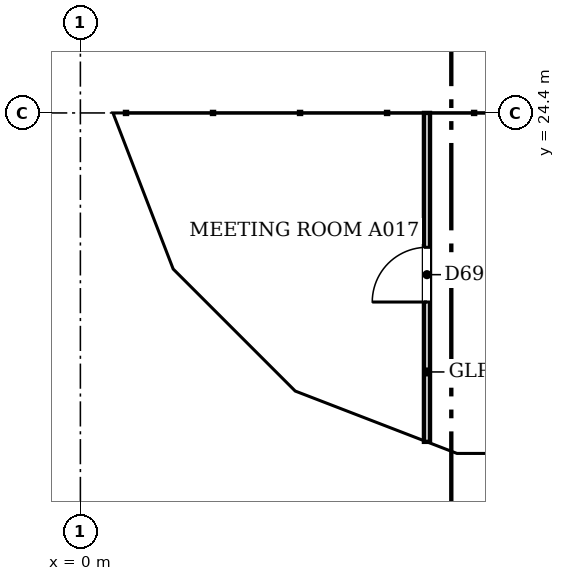
"""IFC4 building model, lengths in metres.
Left out: names, types, materials, properties, quantities, classifications, styles, units other than length and angle.
Written with IfcOpenShell. Run it as: python <this file> out.ifc"""

import sys

from ifc_helpers import new_model, si_unit, direction, frame, frame_2d, origin, place, context, subcontext, project, spatial, polyline, rectangle, outline, extrude, faceted_brep, source, transform, mapped, element, fill, save


model = new_model("IFC4")
c1 = context("Model", 3, precision=1e-05, world=origin(), true_north=direction((0.0, 1.0)))
c2 = subcontext(c1, "Body", "Model", "MODEL_VIEW")
j1 = project(units=[si_unit("LENGTHUNIT", "METRE"), si_unit("PLANEANGLEUNIT", "RADIAN")], contexts=[c1])
p1 = place(None, origin())
s1 = spatial("IfcSite", under=j1, at=p1, CompositionType="ELEMENT")
p2 = place(p1, origin())
s2 = spatial("IfcBuilding", under=s1, at=p2, CompositionType="ELEMENT")
p3 = place(p2, frame((0.0, 0.0, 80.0)))
s3 = spatial("IfcBuildingStorey", under=s2, at=p3, CompositionType="ELEMENT", Elevation=80.0)
m1 = source(origin(), c2, "Body", "Brep", [
    faceted_brep([(3.003, -0.25, 0.0), (3.05, -0.25, 0.06), (3.05, -0.25, 7.54), (3.003, -0.25, 7.6), (0.0, -0.25, 3.8), (0.0, 0.25, 3.8), (2.957, 0.25, 7.541), (2.957, 0.25, 0.059), (3.003, 0.0, 0.0), (3.003, 0.0, 7.6)], [[[0, 1, 2, 3, 4]], [[5, 6, 7]], [[1, 0, 8]], [[9, 3, 2]], [[6, 5, 4, 3, 9]], [[5, 7, 8, 0, 4]], [[1, 8, 7, 6, 9, 2]]]),
])
p4 = place(p3, frame((0.25, 27.45, -3.8), z_axis=(0.0, 0.0, 1.0), x_axis=(0.0, -1.0, 0.0)))
e1 = element("IfcWall", 1, at=p4, inside=s3, PredefinedType="SOLIDWALL", context=c2, shape_type="MappedRepresentation", body=[
    mapped(m1, transform((0.0, 0.0, 0.0), scale=1.0)),
])
m2 = source(origin(), c2, "Body", "SweptSolid", [
    extrude(outline(polyline([(2.803, 6.944), (0.319, 3.8), (2.803, 0.656), (2.803, 6.944)])), frame((0.0, 0.26, 0.0), z_axis=(0.0, -1.0, 0.0), x_axis=(1.0, 0.0, 0.0)), (0.0, 0.0, 1.0), 0.52),
])
p5 = place(p4, origin())
e2 = element("IfcOpeningElement", 2, at=p5, cuts=e1, PredefinedType="OPENING", context=c2, shape_type="MappedRepresentation", body=[
    mapped(m2, transform((0.0, 0.0, 0.0), scale=1.0)),
])
m3 = source(origin(), c2, "Body", "Brep", [
    faceted_brep([(0.047, -0.25, 0.0), (2.997, -0.25, 3.8), (0.047, -0.25, 7.6), (0.0, -0.25, 7.541), (0.0, -0.25, 0.059), (0.093, 0.25, 7.54), (2.944, 0.25, 3.868), (2.944, 0.25, 3.732), (0.093, 0.25, 0.06), (2.997, 0.0, 3.8), (0.047, 0.0, 0.0), (0.047, 0.0, 7.6)], [[[0, 1, 2, 3, 4]], [[5, 6, 7, 8]], [[8, 7, 9, 1, 0, 10]], [[6, 5, 11, 2, 1, 9]], [[3, 2, 11]], [[10, 0, 4]], [[8, 10, 4, 3, 11, 5]], [[9, 7, 6]]]),
])
p6 = place(p3, frame((0.233, 24.49, -3.8), z_axis=(0.0, 0.0, 1.0), x_axis=(0.359901446078, -0.932990326376, 0.0)))
e3 = element("IfcWall", 3, at=p6, inside=s3, PredefinedType="SOLIDWALL", context=c2, shape_type="MappedRepresentation", body=[
    mapped(m3, transform((0.0, 0.0, 0.0), scale=1.0)),
])
m4 = source(origin(), c2, "Body", "SweptSolid", [
    extrude(outline(polyline([(0.247, 0.665), (2.681, 3.8), (0.247, 6.935), (0.247, 0.665)])), frame((0.0, 0.26, 0.0), z_axis=(0.0, -1.0, 0.0), x_axis=(1.0, 0.0, 0.0)), (0.0, 0.0, 1.0), 0.52),
])
p7 = place(p6, origin())
e4 = element("IfcOpeningElement", 4, at=p7, cuts=e3, PredefinedType="OPENING", context=c2, shape_type="MappedRepresentation", body=[
    mapped(m4, transform((0.0, 0.0, 0.0), scale=1.0)),
])
m5 = source(origin(), c2, "Body", "Brep", [
    faceted_brep([(2.944, -0.25, 0.0), (2.997, -0.25, 0.068), (2.997, -0.25, 7.532), (2.944, -0.25, 7.6), (0.0, -0.25, 3.8), (0.053, 0.25, 3.868), (2.891, 0.25, 7.532), (2.891, 0.25, 0.068), (0.053, 0.25, 3.732), (2.944, 0.0, 0.0), (2.944, 0.0, 7.6), (0.0, 0.0, 3.8)], [[[0, 1, 2, 3, 4]], [[5, 6, 7, 8]], [[1, 0, 9]], [[10, 3, 2]], [[6, 5, 11, 4, 3, 10]], [[8, 7, 9, 0, 4, 11]], [[8, 11, 5]], [[1, 9, 7, 6, 10, 2]]]),
])
p8 = place(p3, frame((1.312, 21.694, -3.8), z_axis=(0.0, 0.0, 1.0), x_axis=(0.707066050402, -0.707147509625, 0.0)))
e5 = element("IfcWall", 5, at=p8, inside=s3, PredefinedType="SOLIDWALL", context=c2, shape_type="MappedRepresentation", body=[
    mapped(m5, transform((0.0, 0.0, 0.0), scale=1.0)),
])
m6 = source(origin(), c2, "Body", "SweptSolid", [
    extrude(outline(polyline([(2.744, 6.934), (0.316, 3.8), (2.744, 0.666), (2.744, 6.934)])), frame((0.0, 0.26, 0.0), z_axis=(0.0, -1.0, 0.0), x_axis=(1.0, 0.0, 0.0)), (0.0, 0.0, 1.0), 0.52),
])
p9 = place(p8, origin())
e6 = element("IfcOpeningElement", 6, at=p9, cuts=e5, PredefinedType="OPENING", context=c2, shape_type="MappedRepresentation", body=[
    mapped(m6, transform((0.0, 0.0, 0.0), scale=1.0)),
])
m7 = source(origin(), c2, "Body", "Brep", [
    faceted_brep([(0.053, -0.25, 0.0), (3.003, -0.25, 3.8), (0.053, -0.25, 7.6), (0.0, -0.25, 7.532), (0.0, -0.25, 0.068), (0.106, 0.25, 7.532), (2.957, 0.25, 3.86), (2.957, 0.25, 3.74), (0.106, 0.25, 0.068), (3.003, 0.0, 3.8), (0.053, 0.0, 0.0), (0.053, 0.0, 7.6)], [[[0, 1, 2, 3, 4]], [[5, 6, 7, 8]], [[8, 7, 9, 1, 0, 10]], [[6, 5, 11, 2, 1, 9]], [[3, 2, 11]], [[10, 0, 4]], [[8, 10, 4, 3, 11, 5]], [[9, 7, 6]]]),
])
p10 = place(p3, frame((3.344, 19.631, -3.8), z_axis=(0.0, 0.0, 1.0), x_axis=(0.933007896601, -0.359855894603, 0.0)))
e7 = element("IfcWall", 7, at=p10, inside=s3, PredefinedType="SOLIDWALL", context=c2, shape_type="MappedRepresentation", body=[
    mapped(m7, transform((0.0, 0.0, 0.0), scale=1.0)),
])
m8 = source(origin(), c2, "Body", "SweptSolid", [
    extrude(outline(polyline([(0.253, 0.665), (2.687, 3.8), (0.253, 6.935), (0.253, 0.665)])), frame((0.0, 0.26, 0.0), z_axis=(0.0, -1.0, 0.0), x_axis=(1.0, 0.0, 0.0)), (0.0, 0.0, 1.0), 0.52),
])
p11 = place(p10, origin())
e8 = element("IfcOpeningElement", 8, at=p11, cuts=e7, PredefinedType="OPENING", context=c2, shape_type="MappedRepresentation", body=[
    mapped(m8, transform((0.0, 0.0, 0.0), scale=1.0)),
])
m9 = source(origin(), c2, "Body", "Brep", [
    faceted_brep([(3.003, -0.25, 0.0), (6.053, -0.25, 3.8), (3.003, -0.25, 7.6), (0.0, -0.25, 3.8), (0.047, 0.25, 3.859), (3.003, 0.25, 7.6), (6.053, 0.25, 3.8), (3.003, 0.25, 0.0), (0.047, 0.25, 3.741), (0.0, 0.0, 3.8)], [[[0, 1, 2, 3]], [[4, 5, 6, 7, 8]], [[7, 6, 1, 0]], [[6, 5, 2, 1]], [[5, 4, 9, 3, 2]], [[8, 7, 0, 3, 9]], [[8, 9, 4]]]),
])
p12 = place(p3, frame((6.146, 18.55, -3.8), z_axis=(0.0, 0.0, 1.0), x_axis=(1.0, 0.0, 0.0)))
e9 = element("IfcWall", 9, at=p12, inside=s3, PredefinedType="SOLIDWALL", context=c2, shape_type="MappedRepresentation", body=[
    mapped(m9, transform((0.0, 0.0, 0.0), scale=1.0)),
])
m10 = source(origin(), c2, "Body", "SweptSolid", [
    extrude(outline(polyline([(3.005, 0.401), (5.733, 3.8), (3.005, 7.199), (0.319, 3.8), (3.005, 0.401)])), frame((0.0, 0.26, 0.0), z_axis=(0.0, -1.0, 0.0), x_axis=(1.0, 0.0, 0.0)), (0.0, 0.0, 1.0), 0.52),
])
p13 = place(p12, origin())
e10 = element("IfcOpeningElement", 10, at=p13, cuts=e9, PredefinedType="OPENING", context=c2, shape_type="MappedRepresentation", body=[
    mapped(m10, transform((0.0, 0.0, 0.0), scale=1.0)),
])
p14 = place(p2, frame((0.0, 0.0, 83.8)))
s4 = spatial("IfcBuildingStorey", under=s2, at=p14, CompositionType="ELEMENT", Elevation=83.8)
m11 = source(origin(), c2, "Body", "Brep", [
    faceted_brep([(3.05, -0.25, 0.0), (6.053, -0.25, 3.8), (3.05, -0.25, 7.6), (0.0, -0.25, 3.8), (0.0, 0.25, 3.8), (3.05, 0.25, 7.6), (6.007, 0.25, 3.859), (6.007, 0.25, 3.741), (3.05, 0.25, 0.0), (6.053, 0.0, 3.8)], [[[0, 1, 2, 3]], [[4, 5, 6, 7, 8]], [[8, 7, 9, 1, 0]], [[6, 5, 2, 1, 9]], [[5, 4, 3, 2]], [[4, 8, 0, 3]], [[9, 7, 6]]]),
])
p15 = place(p14, frame((0.25, 30.5, -3.8), z_axis=(0.0, 0.0, 1.0), x_axis=(0.0, -1.0, 0.0)))
e11 = element("IfcWall", 11, at=p15, inside=s4, PredefinedType="SOLIDWALL", context=c2, shape_type="MappedRepresentation", body=[
    mapped(m11, transform((0.0, 0.0, 0.0), scale=1.0)),
])
m12 = source(origin(), c2, "Body", "SweptSolid", [
    extrude(outline(polyline([(3.049, 0.401), (5.735, 3.8), (3.049, 7.199), (0.321, 3.8), (3.049, 0.401)])), frame((0.0, 0.26, 0.0), z_axis=(0.0, -1.0, 0.0), x_axis=(1.0, 0.0, 0.0)), (0.0, 0.0, 1.0), 0.52),
])
p16 = place(p15, origin())
e12 = element("IfcOpeningElement", 12, at=p16, cuts=e11, PredefinedType="OPENING", context=c2, shape_type="MappedRepresentation", body=[
    mapped(m12, transform((0.0, 0.0, 0.0), scale=1.0)),
])
m13 = source(origin(), c2, "Body", "Brep", [
    faceted_brep([(2.95, -0.25, 0.0), (3.003, -0.25, 0.068), (3.003, -0.25, 7.532), (2.95, -0.25, 7.6), (0.0, -0.25, 3.8), (0.047, 0.25, 3.86), (2.898, 0.25, 7.532), (2.898, 0.25, 0.068), (0.047, 0.25, 3.74), (2.95, 0.0, 0.0), (2.95, 0.0, 7.6), (0.0, 0.0, 3.8)], [[[0, 1, 2, 3, 4]], [[5, 6, 7, 8]], [[1, 0, 9]], [[10, 3, 2]], [[6, 5, 11, 4, 3, 10]], [[8, 7, 9, 0, 4, 11]], [[8, 11, 5]], [[1, 9, 7, 6, 10, 2]]]),
])
p17 = place(p14, frame((0.25, 24.447, -3.8), z_axis=(0.0, 0.0, 1.0), x_axis=(0.35992665181, -0.932980602862, 0.0)))
e13 = element("IfcWall", 13, at=p17, inside=s4, PredefinedType="SOLIDWALL", context=c2, shape_type="MappedRepresentation", body=[
    mapped(m13, transform((0.0, 0.0, 0.0), scale=1.0)),
])
m14 = source(origin(), c2, "Body", "SweptSolid", [
    extrude(outline(polyline([(2.75, 6.935), (0.316, 3.8), (2.75, 0.665), (2.75, 6.935)])), frame((0.0, 0.26, 0.0), z_axis=(0.0, -1.0, 0.0), x_axis=(1.0, 0.0, 0.0)), (0.0, 0.0, 1.0), 0.52),
])
p18 = place(p17, origin())
e14 = element("IfcOpeningElement", 14, at=p18, cuts=e13, PredefinedType="OPENING", context=c2, shape_type="MappedRepresentation", body=[
    mapped(m14, transform((0.0, 0.0, 0.0), scale=1.0)),
])
m15 = source(origin(), c2, "Body", "Brep", [
    faceted_brep([(0.053, -0.25, 0.0), (2.997, -0.25, 3.8), (0.053, -0.25, 7.6), (0.0, -0.25, 7.532), (0.0, -0.25, 0.068), (0.106, 0.25, 7.532), (2.944, 0.25, 3.868), (2.944, 0.25, 3.732), (0.106, 0.25, 0.068), (2.997, 0.0, 3.8), (0.053, 0.0, 0.0), (0.053, 0.0, 7.6)], [[[0, 1, 2, 3, 4]], [[5, 6, 7, 8]], [[8, 7, 9, 1, 0, 10]], [[6, 5, 11, 2, 1, 9]], [[3, 2, 11]], [[10, 0, 4]], [[8, 10, 4, 3, 11, 5]], [[9, 7, 6]]]),
])
p19 = place(p14, frame((1.274, 21.731, -3.8), z_axis=(0.0, 0.0, 1.0), x_axis=(0.707147509625, -0.707066050402, 0.0)))
e15 = element("IfcWall", 15, at=p19, inside=s4, PredefinedType="SOLIDWALL", context=c2, shape_type="MappedRepresentation", body=[
    mapped(m15, transform((0.0, 0.0, 0.0), scale=1.0)),
])
m16 = source(origin(), c2, "Body", "SweptSolid", [
    extrude(outline(polyline([(0.253, 0.666), (2.681, 3.8), (0.253, 6.934), (0.253, 0.666)])), frame((0.0, 0.26, 0.0), z_axis=(0.0, -1.0, 0.0), x_axis=(1.0, 0.0, 0.0)), (0.0, 0.0, 1.0), 0.52),
])
p20 = place(p19, origin())
e16 = element("IfcOpeningElement", 16, at=p20, cuts=e15, PredefinedType="OPENING", context=c2, shape_type="MappedRepresentation", body=[
    mapped(m16, transform((0.0, 0.0, 0.0), scale=1.0)),
])
m17 = source(origin(), c2, "Body", "Brep", [
    faceted_brep([(2.95, -0.25, 0.0), (2.997, -0.25, 0.059), (2.997, -0.25, 7.541), (2.95, -0.25, 7.6), (0.0, -0.25, 3.8), (0.053, 0.25, 3.868), (2.904, 0.25, 7.54), (2.904, 0.25, 0.06), (0.053, 0.25, 3.732), (2.95, 0.0, 0.0), (2.95, 0.0, 7.6), (0.0, 0.0, 3.8)], [[[0, 1, 2, 3, 4]], [[5, 6, 7, 8]], [[1, 0, 9]], [[10, 3, 2]], [[6, 5, 11, 4, 3, 10]], [[8, 7, 9, 0, 4, 11]], [[8, 11, 5]], [[1, 9, 7, 6, 10, 2]]]),
])
p21 = place(p14, frame((3.394, 19.612, -3.8), z_axis=(0.0, 0.0, 1.0), x_axis=(0.932990326376, -0.359901446078, 0.0)))
e17 = element("IfcWall", 17, at=p21, inside=s4, PredefinedType="SOLIDWALL", context=c2, shape_type="MappedRepresentation", body=[
    mapped(m17, transform((0.0, 0.0, 0.0), scale=1.0)),
])
p22 = place(p21, origin())
e18 = element("IfcOpeningElement", 18, at=p22, cuts=e17, PredefinedType="OPENING", context=c2, shape_type="MappedRepresentation", body=[
    mapped(m14, transform((0.0, 0.0, 0.0), scale=1.0)),
])
m18 = source(origin(), c2, "Body", "Brep", [
    faceted_brep([(0.047, -0.25, 0.0), (3.05, -0.25, 3.8), (0.047, -0.25, 7.6), (0.0, -0.25, 7.54), (0.0, -0.25, 0.06), (0.093, 0.25, 7.541), (3.05, 0.25, 3.8), (0.093, 0.25, 0.059), (0.047, 0.0, 0.0), (0.047, 0.0, 7.6)], [[[0, 1, 2, 3, 4]], [[5, 6, 7]], [[7, 6, 1, 0, 8]], [[6, 5, 9, 2, 1]], [[3, 2, 9]], [[8, 0, 4]], [[7, 8, 4, 3, 9, 5]]]),
])
p23 = place(p14, frame((6.1, 18.55, -3.8), z_axis=(0.0, 0.0, 1.0), x_axis=(1.0, 0.0, 0.0)))
e19 = element("IfcWall", 19, at=p23, inside=s4, PredefinedType="SOLIDWALL", context=c2, shape_type="MappedRepresentation", body=[
    mapped(m18, transform((0.0, 0.0, 0.0), scale=1.0)),
])
m19 = source(origin(), c2, "Body", "SweptSolid", [
    extrude(outline(polyline([(0.247, 0.656), (2.731, 3.8), (0.247, 6.944), (0.247, 0.656)])), frame((0.0, 0.26, 0.0), z_axis=(0.0, -1.0, 0.0), x_axis=(1.0, 0.0, 0.0)), (0.0, 0.0, 1.0), 0.52),
])
p24 = place(p23, origin())
e20 = element("IfcOpeningElement", 20, at=p24, cuts=e19, PredefinedType="OPENING", context=c2, shape_type="MappedRepresentation", body=[
    mapped(m19, transform((0.0, 0.0, 0.0), scale=1.0)),
])
p25 = place(p3, frame((5.7, 18.99, 0.0), z_axis=(0.0, 0.0, 1.0), x_axis=(0.0, 1.0, 0.0)))
e21 = element("IfcWall", 21, at=p25, inside=s3, PredefinedType="PARTITIONING", context=c2, shape_type="SweptSolid", body=[
    extrude(rectangle(XDim=5.41, YDim=0.1, at=frame_2d((2.705, 0.0))), origin(), (0.0, 0.0, 1.0), 3.067),
])
m20 = source(origin(), c2, "Body", "SweptSolid", [
    extrude(rectangle(XDim=0.9, YDim=2.1, at=frame_2d((0.45, 1.05))), frame((0.0, 0.06, 0.0), z_axis=(0.0, -1.0, 0.0), x_axis=(1.0, 0.0, 0.0)), (0.0, 0.0, 1.0), 0.12),
])
p26 = place(p25, frame((2.3, 0.0, 0.0)))
e22 = element("IfcOpeningElement", 22, at=p26, cuts=e21, PredefinedType="OPENING", context=c2, shape_type="MappedRepresentation", body=[
    mapped(m20, transform((0.0, 0.0, 0.0), scale=1.0)),
])
m21 = source(origin(), c2, "Body", "SweptSolid", [
    extrude(rectangle(XDim=0.9, YDim=2.1, at=frame_2d((0.45, 1.05))), frame((0.0, 0.025, 0.0), z_axis=(0.0, -1.0, 0.0), x_axis=(1.0, 0.0, 0.0)), (0.0, 0.0, 1.0), 0.05),
])
p27 = place(p26, origin())
e23 = element("IfcDoor", 23, at=p27, inside=s3, OperationType="SINGLE_SWING_LEFT", PredefinedType="DOOR", context=c2, shape_type="MappedRepresentation", body=[
    mapped(m21, transform((0.0, 0.0, 0.0), scale=1.0)),
])
fill(e22, e23)
save(model, sys.argv[1])
